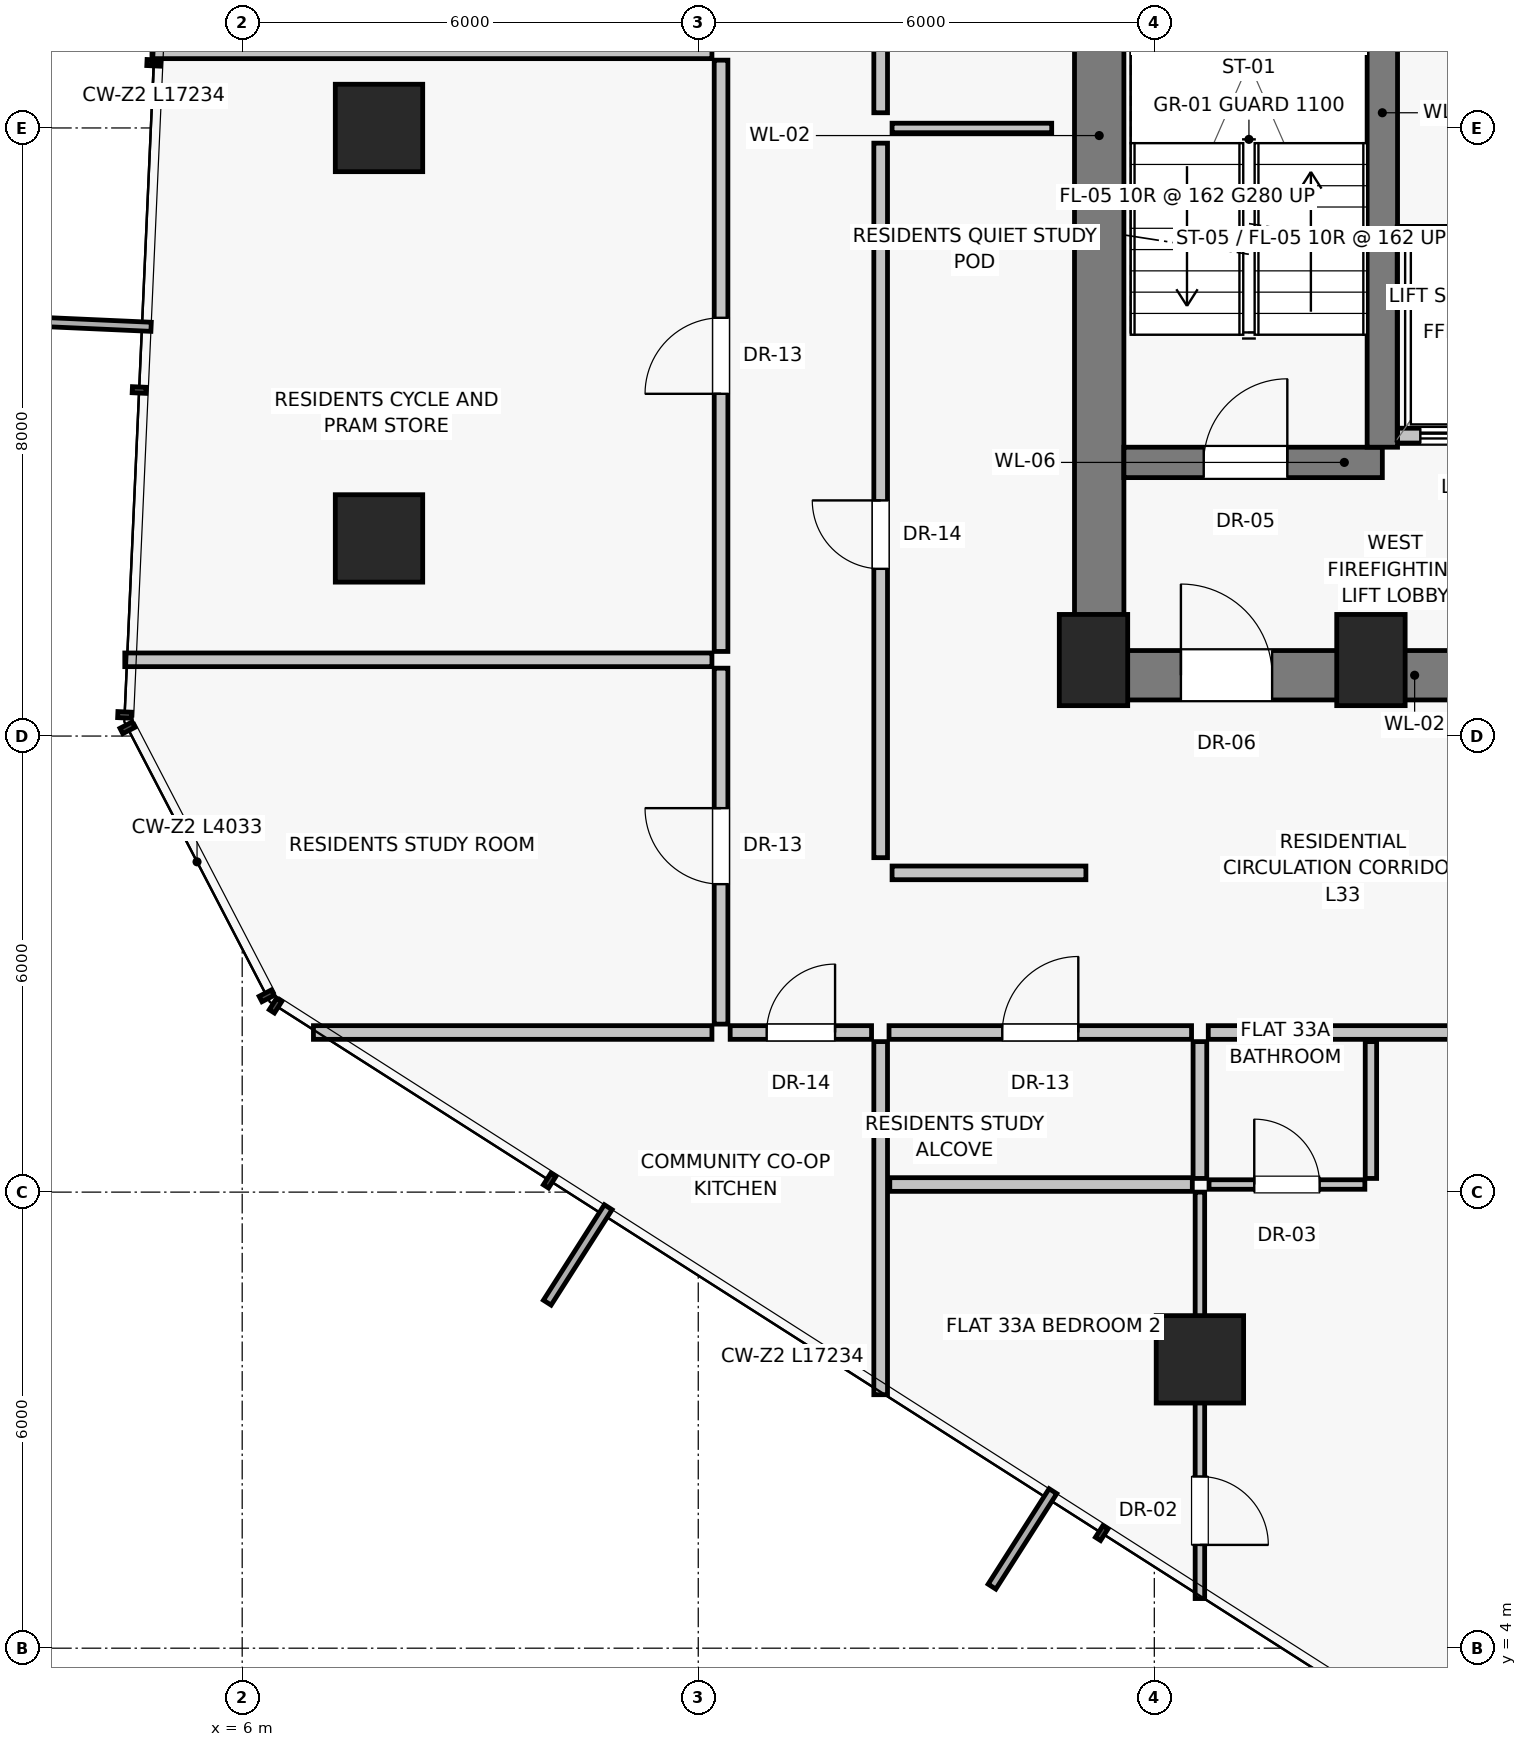
"""IFC4 building model, lengths in metres.
Left out: names, types, materials, properties, quantities, classifications, styles, units other than length and angle.
Written with IfcOpenShell. Run it as: python <this file> out.ifc"""

import sys

from ifc_helpers import new_model, si_unit, direction, frame, frame_2d, origin, origin_2d, place, context, subcontext, project, spatial, rectangle, extrude, source, transform, mapped, element, fill, save


model = new_model("IFC4")
c1 = context("Model", 3, precision=1e-05, world=origin(), true_north=direction((0.0, 1.0)))
c2 = subcontext(c1, "Body", "Model", "MODEL_VIEW")
j1 = project(units=[si_unit("LENGTHUNIT", "METRE"), si_unit("PLANEANGLEUNIT", "RADIAN")], contexts=[c1])
p1 = place(None, origin())
s1 = spatial("IfcSite", under=j1, at=p1, CompositionType="ELEMENT")
p2 = place(p1, origin())
s2 = spatial("IfcBuilding", under=s1, at=p2, CompositionType="ELEMENT")
p3 = place(p2, frame((0.0, 0.0, 119.75)))
s3 = spatial("IfcBuildingStorey", under=s2, at=p3, CompositionType="ELEMENT", Elevation=119.75)
for number, where, z_axis, x_axis in (
    (1, (17.2, 17.0, 0.0), (0.0, 0.0, 1.0), (1.0, 0.0, 0.0)),
    (2, (20.85, 17.0, 0.0), (0.0, 0.0, 1.0), (1.0, 0.0, 0.0)),
):
    element("IfcColumn", number, at=place(p3, frame(where, z_axis=z_axis, x_axis=x_axis)), inside=s3, PredefinedType="PILASTER", context=c2, shape_type="SweptSolid", body=[
        extrude(rectangle(XDim=0.9, YDim=1.2, at=origin_2d()), origin(), (0.0, 0.0, 1.0), 3.25),
    ])
for number, where, z_axis, x_axis in (
    (3, (7.8, 24.0, 0.0), (0.0, 0.0, 1.0), (1.0, 0.0, 0.0)),
    (4, (7.8, 18.6, 0.0), (0.0, 0.0, 1.0), (1.0, 0.0, 0.0)),
    (5, (18.6, 7.8, 0.0), (0.0, 0.0, 1.0), (1.0, 0.0, 0.0)),
):
    element("IfcColumn", number, at=place(p3, frame(where, z_axis=z_axis, x_axis=x_axis)), inside=s3, PredefinedType="COLUMN", context=c2, shape_type="SweptSolid", body=[
        extrude(rectangle(XDim=1.15, YDim=1.15, at=origin_2d()), origin(), (0.0, 0.0, 1.0), 3.25),
    ])
p4 = place(p3, frame((17.275, 16.8, 0.0), z_axis=(0.0, 0.0, 1.0), x_axis=(0.0, 1.0, 0.0)))
e6 = element("IfcWall", 6, at=p4, inside=s3, PredefinedType="SHEAR", context=c2, shape_type="SweptSolid", body=[
    extrude(rectangle(XDim=14.2, YDim=0.65, at=frame_2d((7.1, 0.0))), origin(), (0.0, 0.0, 1.0), 3.0),
])
p5 = place(p3, frame((17.2, 16.8, 0.0), z_axis=(0.0, 0.0, 1.0), x_axis=(1.0, 0.0, 0.0)))
e7 = element("IfcWall", 7, at=p5, inside=s3, PredefinedType="SHEAR", context=c2, shape_type="SweptSolid", body=[
    extrude(rectangle(XDim=5.85, YDim=0.65, at=frame_2d((2.925, 0.0))), origin(), (0.0, 0.0, 1.0), 3.0),
])
p6 = place(p5, frame((1.15, 0.0, 0.0)))
e8 = element("IfcOpeningElement", 8, at=p6, cuts=e7, PredefinedType="OPENING", context=c2, shape_type="SweptSolid", body=[
    extrude(rectangle(XDim=1.2, YDim=2.03, at=frame_2d((0.6, 1.015))), frame((0.0, 0.335, 0.0), z_axis=(0.0, -1.0, 0.0), x_axis=(1.0, 0.0, 0.0)), (0.0, 0.0, 1.0), 0.67),
])
p7 = place(p3, frame((17.6, 19.6, 0.0), z_axis=(0.0, 0.0, 1.0), x_axis=(1.0, 0.0, 0.0)))
e9 = element("IfcWall", 9, at=p7, inside=s3, PredefinedType="SHEAR", context=c2, shape_type="SweptSolid", body=[
    extrude(rectangle(XDim=3.4, YDim=0.4, at=frame_2d((1.7, 0.0))), origin(), (0.0, 0.0, 1.0), 3.0),
])
p8 = place(p7, frame((1.05, 0.0, 0.0)))
e10 = element("IfcOpeningElement", 10, at=p8, cuts=e9, PredefinedType="OPENING", context=c2, shape_type="SweptSolid", body=[
    extrude(rectangle(XDim=1.1, YDim=2.03, at=frame_2d((0.55, 1.015))), frame((0.0, 0.21, 0.0), z_axis=(0.0, -1.0, 0.0), x_axis=(1.0, 0.0, 0.0)), (0.0, 0.0, 1.0), 0.42),
])
p9 = place(p3, frame((21.2, 19.95, 0.0), z_axis=(0.0, 0.0, 1.0), x_axis=(1.0, 0.0, 0.0)))
e11 = element("IfcWall", 11, at=p9, inside=s3, PredefinedType="SOLIDWALL", context=c2, shape_type="SweptSolid", body=[
    extrude(rectangle(XDim=1.85, YDim=0.2, at=frame_2d((0.925, 0.0))), origin(), (0.0, 0.0, 1.0), 3.0),
])
p10 = place(p9, frame((0.3, 0.0, 0.0)))
e12 = element("IfcOpeningElement", 12, at=p10, cuts=e11, PredefinedType="OPENING", context=c2, shape_type="SweptSolid", body=[
    extrude(rectangle(XDim=1.3, YDim=2.25, at=frame_2d((0.65, 1.125))), frame((0.0, 0.11, 0.0), z_axis=(0.0, -1.0, 0.0), x_axis=(1.0, 0.0, 0.0)), (0.0, 0.0, 1.0), 0.22),
])
p11 = place(p3, frame((21.0, 19.8, 0.0), z_axis=(0.0, 0.0, 1.0), x_axis=(0.0, 1.0, 0.0)))
e13 = element("IfcWall", 13, at=p11, inside=s3, PredefinedType="SHEAR", context=c2, shape_type="SweptSolid", body=[
    extrude(rectangle(XDim=8.8, YDim=0.4, at=frame_2d((4.4, 0.0))), origin(), (0.0, 0.0, 1.0), 3.0),
])
p12 = place(p3, frame((21.2, 22.6, 0.0), z_axis=(0.0, 0.0, 1.0), x_axis=(1.0, 0.0, 0.0)))
e14 = element("IfcWall", 14, at=p12, inside=s3, PredefinedType="SOLIDWALL", context=c2, shape_type="SweptSolid", body=[
    extrude(rectangle(XDim=2.65, YDim=0.2, at=frame_2d((1.325, 0.0))), origin(), (0.0, 0.0, 1.0), 3.0),
])
p13 = place(p3, frame((14.4, 14.4, 0.0), z_axis=(0.0, 0.0, 1.0), x_axis=(0.0, 1.0, 0.0)))
e15 = element("IfcWall", 15, at=p13, inside=s3, PredefinedType="PARTITIONING", context=c2, shape_type="SweptSolid", body=[
    extrude(rectangle(XDim=9.4, YDim=0.18, at=frame_2d((4.7, 0.0))), origin(), (0.0, 0.0, 1.0), 3.0),
])
p14 = place(p13, frame((3.8, 0.0, 0.0)))
e16 = element("IfcOpeningElement", 16, at=p14, cuts=e15, PredefinedType="OPENING", context=c2, shape_type="SweptSolid", body=[
    extrude(rectangle(XDim=0.9, YDim=2.01, at=frame_2d((0.45, 1.005))), frame((0.0, 0.1, 0.0), z_axis=(0.0, -1.0, 0.0), x_axis=(1.0, 0.0, 0.0)), (0.0, 0.0, 1.0), 0.2),
])
p15 = place(p3, frame((14.4, 24.2, 0.0), z_axis=(0.0, 0.0, 1.0), x_axis=(0.0, 1.0, 0.0)))
e17 = element("IfcWall", 17, at=p15, inside=s3, PredefinedType="PARTITIONING", context=c2, shape_type="SweptSolid", body=[
    extrude(rectangle(XDim=9.2, YDim=0.18, at=frame_2d((4.6, 0.0))), origin(), (0.0, 0.0, 1.0), 3.0),
])
p16 = place(p15, frame((3.8, 0.0, 0.0)))
e18 = element("IfcOpeningElement", 18, at=p16, cuts=e17, PredefinedType="OPENING", context=c2, shape_type="SweptSolid", body=[
    extrude(rectangle(XDim=0.9, YDim=2.01, at=frame_2d((0.45, 1.005))), frame((0.0, 0.1, 0.0), z_axis=(0.0, -1.0, 0.0), x_axis=(1.0, 0.0, 0.0)), (0.0, 0.0, 1.0), 0.2),
])
p17 = place(p3, frame((14.55, 24.0, 0.0), z_axis=(0.0, 0.0, 1.0), x_axis=(1.0, 0.0, 0.0)))
e19 = element("IfcWall", 19, at=p17, inside=s3, PredefinedType="PARTITIONING", context=c2, shape_type="SweptSolid", body=[
    extrude(rectangle(XDim=2.1, YDim=0.125, at=frame_2d((1.05, 0.0))), origin(), (0.0, 0.0, 1.0), 3.0),
])
p18 = place(p3, frame((14.55, 14.2, 0.0), z_axis=(0.0, 0.0, 1.0), x_axis=(1.0, 0.0, 0.0)))
e20 = element("IfcWall", 20, at=p18, inside=s3, PredefinedType="PARTITIONING", context=c2, shape_type="SweptSolid", body=[
    extrude(rectangle(XDim=2.55, YDim=0.18, at=frame_2d((1.275, 0.0))), origin(), (0.0, 0.0, 1.0), 3.0),
])
p19 = place(p3, frame((14.4, 11.98, 0.0), z_axis=(0.0, 0.0, 1.0), x_axis=(0.0, -1.0, 0.0)))
e21 = element("IfcWall", 21, at=p19, inside=s3, PredefinedType="PARTITIONING", context=c2, shape_type="SweptSolid", body=[
    extrude(rectangle(XDim=4.645, YDim=0.18, at=frame_2d((2.323, 0.0))), origin(), (0.0, 0.0, 1.0), 3.0),
])
p20 = place(p3, frame((14.51, 12.1, 0.0), z_axis=(0.0, 0.0, 1.0), x_axis=(1.0, 0.0, 0.0)))
e22 = element("IfcWall", 22, at=p20, inside=s3, PredefinedType="PARTITIONING", context=c2, shape_type="SweptSolid", body=[
    extrude(rectangle(XDim=3.98, YDim=0.18, at=frame_2d((1.99, 0.0))), origin(), (0.0, 0.0, 1.0), 2.58),
])
p21 = place(p20, frame((1.49, 0.0, 0.0)))
e23 = element("IfcOpeningElement", 23, at=p21, cuts=e22, PredefinedType="OPENING", context=c2, shape_type="SweptSolid", body=[
    extrude(rectangle(XDim=1.0, YDim=2.01, at=frame_2d((0.5, 1.005))), frame((0.0, 0.1, 0.0), z_axis=(0.0, -1.0, 0.0), x_axis=(1.0, 0.0, 0.0)), (0.0, 0.0, 1.0), 0.2),
])
p22 = place(p3, frame((18.71, 12.1, 0.0), z_axis=(0.0, 0.0, 1.0), x_axis=(1.0, 0.0, 0.0)))
e24 = element("IfcWall", 24, at=p22, inside=s3, PredefinedType="PARTITIONING", context=c2, shape_type="SweptSolid", body=[
    extrude(rectangle(XDim=14.78, YDim=0.18, at=frame_2d((7.39, 0.0))), origin(), (0.0, 0.0, 1.0), 2.58),
])
p23 = place(p22, frame((5.94, 0.0, 0.0)))
e25 = element("IfcOpeningElement", 25, at=p23, cuts=e24, PredefinedType="OPENING", context=c2, shape_type="SweptSolid", body=[
    extrude(rectangle(XDim=0.95, YDim=2.02, at=frame_2d((0.475, 1.01))), frame((0.0, 0.1, 0.0), z_axis=(0.0, -1.0, 0.0), x_axis=(1.0, 0.0, 0.0)), (0.0, 0.0, 1.0), 0.2),
])
p24 = place(p3, frame((14.52, 10.1, 0.0), z_axis=(0.0, 0.0, 1.0), x_axis=(1.0, 0.0, 0.0)))
e26 = element("IfcWall", 26, at=p24, inside=s3, PredefinedType="PARTITIONING", context=c2, shape_type="SweptSolid", body=[
    extrude(rectangle(XDim=3.98, YDim=0.18, at=frame_2d((1.99, 0.0))), origin(), (0.0, 0.0, 1.0), 3.0),
])
p25 = place(p3, frame((18.6, 11.98, 0.0), z_axis=(0.0, 0.0, 1.0), x_axis=(0.0, -1.0, 0.0)))
e27 = element("IfcWall", 27, at=p25, inside=s3, PredefinedType="PARTITIONING", context=c2, shape_type="SweptSolid", body=[
    extrude(rectangle(XDim=1.8, YDim=0.18, at=frame_2d((0.9, 0.0))), origin(), (0.0, 0.0, 1.0), 2.378),
])
p26 = place(p3, frame((18.6, 10.0, 0.0), z_axis=(0.0, 0.0, 1.0), x_axis=(0.0, -1.0, 0.0)))
e28 = element("IfcWall", 28, at=p26, inside=s3, PredefinedType="PARTITIONING", context=c2, shape_type="SweptSolid", body=[
    extrude(rectangle(XDim=5.347, YDim=0.125, at=frame_2d((2.674, 0.0))), origin(), (0.0, 0.0, 1.0), 2.378),
])
p27 = place(p26, frame((3.741, 0.0, 0.0)))
e29 = element("IfcOpeningElement", 29, at=p27, cuts=e28, PredefinedType="OPENING", context=c2, shape_type="SweptSolid", body=[
    extrude(rectangle(XDim=0.9, YDim=2.01, at=frame_2d((0.45, 1.005))), frame((0.0, 0.073, 0.0), z_axis=(0.0, -1.0, 0.0), x_axis=(1.0, 0.0, 0.0)), (0.0, 0.0, 1.0), 0.145),
])
p28 = place(p3, frame((20.85, 11.98, 0.0), z_axis=(0.0, 0.0, 1.0), x_axis=(0.0, -1.0, 0.0)))
e30 = element("IfcWall", 30, at=p28, inside=s3, PredefinedType="PARTITIONING", context=c2, shape_type="SweptSolid", body=[
    extrude(rectangle(XDim=1.8, YDim=0.15, at=frame_2d((0.9, 0.0))), origin(), (0.0, 0.0, 1.0), 3.0),
])
p29 = place(p3, frame((18.72, 10.1, 0.0), z_axis=(0.0, 0.0, 1.0), x_axis=(1.0, 0.0, 0.0)))
e31 = element("IfcWall", 31, at=p29, inside=s3, PredefinedType="PARTITIONING", context=c2, shape_type="SweptSolid", body=[
    extrude(rectangle(XDim=2.05, YDim=0.125, at=frame_2d((1.025, 0.0))), origin(), (0.0, 0.0, 1.0), 3.0),
])
p30 = place(p29, frame((0.595, 0.0, 0.0)))
e32 = element("IfcOpeningElement", 32, at=p30, cuts=e31, PredefinedType="OPENING", context=c2, shape_type="SweptSolid", body=[
    extrude(rectangle(XDim=0.86, YDim=2.01, at=frame_2d((0.43, 1.005))), frame((0.0, 0.073, 0.0), z_axis=(0.0, -1.0, 0.0), x_axis=(1.0, 0.0, 0.0)), (0.0, 0.0, 1.0), 0.145),
])
p31 = place(p3, frame((12.18, 12.1, 0.0), z_axis=(0.0, 0.0, 1.0), x_axis=(-1.0, 0.0, 0.0)))
e33 = element("IfcWall", 33, at=p31, inside=s3, PredefinedType="PARTITIONING", context=c2, shape_type="SweptSolid", body=[
    extrude(rectangle(XDim=5.242, YDim=0.18, at=frame_2d((2.621, 0.0))), origin(), (0.0, 0.0, 1.0), 3.0),
])
p32 = place(p3, frame((12.3, 12.21, 0.0), z_axis=(0.0, 0.0, 1.0), x_axis=(0.0, 1.0, 0.0)))
e34 = element("IfcWall", 34, at=p32, inside=s3, PredefinedType="PARTITIONING", context=c2, shape_type="SweptSolid", body=[
    extrude(rectangle(XDim=4.683, YDim=0.18, at=frame_2d((2.342, 0.0))), origin(), (0.0, 0.0, 1.0), 3.0),
])
p33 = place(p32, frame((1.842, 0.0, 0.0)))
e35 = element("IfcOpeningElement", 35, at=p33, cuts=e34, PredefinedType="OPENING", context=c2, shape_type="SweptSolid", body=[
    extrude(rectangle(XDim=1.0, YDim=2.01, at=frame_2d((0.5, 1.005))), frame((0.0, 0.1, 0.0), z_axis=(0.0, -1.0, 0.0), x_axis=(1.0, 0.0, 0.0)), (0.0, 0.0, 1.0), 0.2),
])
p34 = place(p3, frame((12.3, 17.113, 0.0), z_axis=(0.0, 0.0, 1.0), x_axis=(0.0, 1.0, 0.0)))
e36 = element("IfcWall", 36, at=p34, inside=s3, PredefinedType="PARTITIONING", context=c2, shape_type="SweptSolid", body=[
    extrude(rectangle(XDim=7.779, YDim=0.18, at=frame_2d((3.89, 0.0))), origin(), (0.0, 0.0, 1.0), 2.58),
])
p35 = place(p34, frame((3.389, 0.0, 0.0)))
e37 = element("IfcOpeningElement", 37, at=p35, cuts=e36, PredefinedType="OPENING", context=c2, shape_type="SweptSolid", body=[
    extrude(rectangle(XDim=1.0, YDim=2.01, at=frame_2d((0.5, 1.005))), frame((0.0, 0.1, 0.0), z_axis=(0.0, -1.0, 0.0), x_axis=(1.0, 0.0, 0.0)), (0.0, 0.0, 1.0), 0.2),
])
p36 = place(p3, frame((12.18, 17.003, 0.0), z_axis=(0.0, 0.0, 1.0), x_axis=(-1.0, 0.0, 0.0)))
e38 = element("IfcWall", 38, at=p36, inside=s3, PredefinedType="PARTITIONING", context=c2, shape_type="SweptSolid", body=[
    extrude(rectangle(XDim=7.724, YDim=0.18, at=frame_2d((3.862, 0.0))), origin(), (0.0, 0.0, 1.0), 3.0),
])
p37 = place(p3, frame((12.18, 25.002, 0.0), z_axis=(0.0, 0.0, 1.0), x_axis=(-1.0, 0.0, 0.0)))
e39 = element("IfcWall", 39, at=p37, inside=s3, PredefinedType="PARTITIONING", context=c2, shape_type="SweptSolid", body=[
    extrude(rectangle(XDim=7.367, YDim=0.18, at=frame_2d((3.683, 0.0))), origin(), (0.0, 0.0, 1.0), 3.0),
])
p38 = place(p3, frame((12.42, 12.1, 0.0), z_axis=(0.0, 0.0, 1.0), x_axis=(1.0, 0.0, 0.0)))
e40 = element("IfcWall", 40, at=p38, inside=s3, PredefinedType="PARTITIONING", context=c2, shape_type="SweptSolid", body=[
    extrude(rectangle(XDim=1.86, YDim=0.18, at=frame_2d((0.93, 0.0))), origin(), (0.0, 0.0, 1.0), 3.0),
])
p39 = place(p38, frame((0.48, 0.0, 0.0)))
e41 = element("IfcOpeningElement", 41, at=p39, cuts=e40, PredefinedType="OPENING", context=c2, shape_type="SweptSolid", body=[
    extrude(rectangle(XDim=0.9, YDim=2.01, at=frame_2d((0.45, 1.005))), frame((0.0, 0.1, 0.0), z_axis=(0.0, -1.0, 0.0), x_axis=(1.0, 0.0, 0.0)), (0.0, 0.0, 1.0), 0.2),
])
m1 = source(origin(), c2, "Body", "SweptSolid", [
    extrude(rectangle(XDim=1.2, YDim=2.03, at=frame_2d((0.6, 1.015))), frame((0.0, 0.025, 0.0), z_axis=(0.0, -1.0, 0.0), x_axis=(1.0, 0.0, 0.0)), (0.0, 0.0, 1.0), 0.05),
])
p40 = place(p6, origin())
e42 = element("IfcDoor", 42, at=p40, inside=s3, OperationType="SINGLE_SWING_LEFT", PredefinedType="DOOR", context=c2, shape_type="MappedRepresentation", body=[
    mapped(m1, transform((0.0, 0.0, 0.0), scale=1.0)),
])
fill(e8, e42)
m2 = source(origin(), c2, "Body", "SweptSolid", [
    extrude(rectangle(XDim=1.1, YDim=2.03, at=frame_2d((0.55, 1.015))), frame((0.0, 0.025, 0.0), z_axis=(0.0, -1.0, 0.0), x_axis=(1.0, 0.0, 0.0)), (0.0, 0.0, 1.0), 0.05),
])
p41 = place(p8, origin())
e43 = element("IfcDoor", 43, at=p41, inside=s3, OperationType="SINGLE_SWING_RIGHT", PredefinedType="DOOR", context=c2, shape_type="MappedRepresentation", body=[
    mapped(m2, transform((0.0, 0.0, 0.0), scale=1.0)),
])
fill(e10, e43)
m3 = source(origin(), c2, "Body", "SweptSolid", [
    extrude(rectangle(XDim=1.3, YDim=2.25, at=frame_2d((0.65, 1.125))), frame((0.0, 0.025, 0.0), z_axis=(0.0, -1.0, 0.0), x_axis=(1.0, 0.0, 0.0)), (0.0, 0.0, 1.0), 0.05),
])
p42 = place(p10, origin())
e44 = element("IfcDoor", 44, at=p42, inside=s3, OperationType="SLIDING_TO_LEFT", PredefinedType="DOOR", context=c2, shape_type="MappedRepresentation", body=[
    mapped(m3, transform((0.0, 0.0, 0.0), scale=1.0)),
])
fill(e12, e44)
m4 = source(origin(), c2, "Body", "SweptSolid", [
    extrude(rectangle(XDim=0.9, YDim=2.01, at=frame_2d((0.45, 1.005))), frame((0.0, 0.025, 0.0), z_axis=(0.0, -1.0, 0.0), x_axis=(1.0, 0.0, 0.0)), (0.0, 0.0, 1.0), 0.05),
])
p43 = place(p14, origin())
e45 = element("IfcDoor", 45, at=p43, inside=s3, OperationType="SINGLE_SWING_RIGHT", PredefinedType="DOOR", context=c2, shape_type="MappedRepresentation", body=[
    mapped(m4, transform((0.0, 0.0, 0.0), scale=1.0)),
])
fill(e16, e45)
m5 = source(origin(), c2, "Body", "SweptSolid", [
    extrude(rectangle(XDim=1.0, YDim=2.01, at=frame_2d((0.5, 1.005))), frame((0.0, 0.025, 0.0), z_axis=(0.0, -1.0, 0.0), x_axis=(1.0, 0.0, 0.0)), (0.0, 0.0, 1.0), 0.05),
])
p44 = place(p21, origin())
e46 = element("IfcDoor", 46, at=p44, inside=s3, OperationType="SINGLE_SWING_RIGHT", PredefinedType="DOOR", context=c2, shape_type="MappedRepresentation", body=[
    mapped(m5, transform((0.0, 0.0, 0.0), scale=1.0)),
])
fill(e23, e46)
p45 = place(p27, origin())
e47 = element("IfcDoor", 47, at=p45, inside=s3, OperationType="SINGLE_SWING_RIGHT", PredefinedType="DOOR", context=c2, shape_type="MappedRepresentation", body=[
    mapped(m4, transform((0.0, 0.0, 0.0), scale=1.0)),
])
fill(e29, e47)
m6 = source(origin(), c2, "Body", "SweptSolid", [
    extrude(rectangle(XDim=0.86, YDim=2.01, at=frame_2d((0.43, 1.005))), frame((0.0, 0.025, 0.0), z_axis=(0.0, -1.0, 0.0), x_axis=(1.0, 0.0, 0.0)), (0.0, 0.0, 1.0), 0.05),
])
p46 = place(p30, origin())
e48 = element("IfcDoor", 48, at=p46, inside=s3, OperationType="SINGLE_SWING_LEFT", PredefinedType="DOOR", context=c2, shape_type="MappedRepresentation", body=[
    mapped(m6, transform((0.0, 0.0, 0.0), scale=1.0)),
])
fill(e32, e48)
p47 = place(p33, origin())
e49 = element("IfcDoor", 49, at=p47, inside=s3, OperationType="SINGLE_SWING_RIGHT", PredefinedType="DOOR", context=c2, shape_type="MappedRepresentation", body=[
    mapped(m5, transform((0.0, 0.0, 0.0), scale=1.0)),
])
fill(e35, e49)
p48 = place(p35, origin())
e50 = element("IfcDoor", 50, at=p48, inside=s3, OperationType="SINGLE_SWING_LEFT", PredefinedType="DOOR", context=c2, shape_type="MappedRepresentation", body=[
    mapped(m5, transform((0.0, 0.0, 0.0), scale=1.0)),
])
fill(e37, e50)
p49 = place(p39, origin())
e51 = element("IfcDoor", 51, at=p49, inside=s3, OperationType="SINGLE_SWING_RIGHT", PredefinedType="DOOR", context=c2, shape_type="MappedRepresentation", body=[
    mapped(m4, transform((0.0, 0.0, 0.0), scale=1.0)),
])
fill(e41, e51)
save(model, sys.argv[1])
